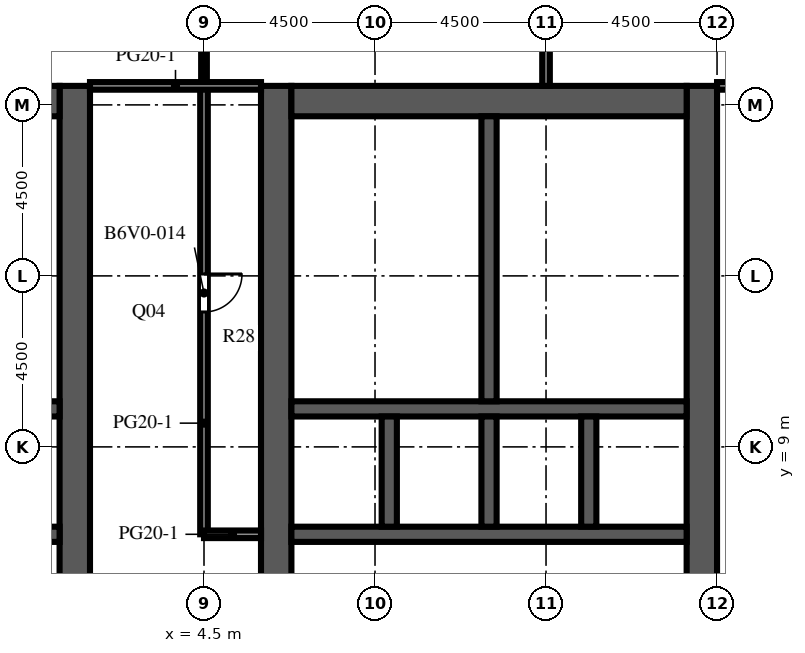
"""IFC4 building model, lengths in metres.
Left out: names, types, materials, properties, quantities, classifications, styles, units other than length and angle.
Written with IfcOpenShell. Run it as: python <this file> out.ifc"""

import sys

from ifc_helpers import new_model, si_unit, direction, frame, frame_2d, origin, place, context, subcontext, project, spatial, rectangle, extrude, element, fill, save


model = new_model("IFC4")
c1 = context("Model", 3, precision=1e-05, world=origin(), true_north=direction((0.0, 1.0)))
c2 = subcontext(c1, "Body", "Model", "MODEL_VIEW")
j1 = project(units=[si_unit("LENGTHUNIT", "METRE"), si_unit("PLANEANGLEUNIT", "RADIAN")], contexts=[c1])
p1 = place(None, origin())
s1 = spatial("IfcSite", under=j1, at=p1, CompositionType="ELEMENT")
p2 = place(p1, origin())
s2 = spatial("IfcBuilding", under=s1, at=p2, CompositionType="ELEMENT")
p3 = place(p2, frame((0.0, 0.0, 199.7)))
s3 = spatial("IfcBuildingStorey", under=s2, at=p3, CompositionType="ELEMENT", Elevation=199.7)
p4 = place(p3, frame((1.1, -9.0, 0.0), z_axis=(0.0, 0.0, 1.0), x_axis=(0.0, 1.0, 0.0)))
e1 = element("IfcWall", 1, at=p4, inside=s3, PredefinedType="SHEAR", context=c2, shape_type="SweptSolid", body=[
    extrude(rectangle(XDim=27.5, YDim=0.8, at=frame_2d((13.75, 0.0))), origin(), (0.0, 0.0, 1.0), 4.1),
])
p5 = place(p4, frame((12.55, 0.0, 0.0)))
e2 = element("IfcOpeningElement", 2, at=p5, cuts=e1, PredefinedType="OPENING", context=c2, shape_type="SweptSolid", body=[
    extrude(rectangle(XDim=2.4, YDim=2.4, at=frame_2d((1.2, 1.2))), frame((0.0, 0.41, 0.0), z_axis=(0.0, -1.0, 0.0), x_axis=(1.0, 0.0, 0.0)), (0.0, 0.0, 1.0), 0.82),
])
p6 = place(p4, frame((3.95, 0.0, 0.0)))
e3 = element("IfcOpeningElement", 3, at=p6, cuts=e1, PredefinedType="OPENING", context=c2, shape_type="SweptSolid", body=[
    extrude(rectangle(XDim=1.2, YDim=2.1, at=frame_2d((0.6, 1.05))), frame((0.0, 0.41, 0.0), z_axis=(0.0, -1.0, 0.0), x_axis=(1.0, 0.0, 0.0)), (0.0, 0.0, 1.0), 0.82),
])
p7 = place(p4, frame((19.45, 0.0, 0.0)))
e4 = element("IfcOpeningElement", 4, at=p7, cuts=e1, PredefinedType="OPENING", context=c2, shape_type="SweptSolid", body=[
    extrude(rectangle(XDim=1.0, YDim=2.1, at=frame_2d((0.5, 1.05))), frame((0.0, 0.41, 0.0), z_axis=(0.0, -1.0, 0.0), x_axis=(1.0, 0.0, 0.0)), (0.0, 0.0, 1.0), 0.82),
])
p8 = place(p4, frame((21.137, 0.0, 0.0)))
e5 = element("IfcOpeningElement", 5, at=p8, cuts=e1, PredefinedType="OPENING", context=c2, shape_type="SweptSolid", body=[
    extrude(rectangle(XDim=1.0, YDim=2.1, at=frame_2d((0.5, 1.05))), frame((0.0, 0.41, 0.0), z_axis=(0.0, -1.0, 0.0), x_axis=(1.0, 0.0, 0.0)), (0.0, 0.0, 1.0), 0.82),
])
p9 = place(p4, frame((23.2, 0.0, 0.0)))
e6 = element("IfcOpeningElement", 6, at=p9, cuts=e1, PredefinedType="OPENING", context=c2, shape_type="SweptSolid", body=[
    extrude(rectangle(XDim=1.0, YDim=2.1, at=frame_2d((0.5, 1.05))), frame((0.0, 0.41, 0.0), z_axis=(0.0, -1.0, 0.0), x_axis=(1.0, 0.0, 0.0)), (0.0, 0.0, 1.0), 0.82),
])
p10 = place(p4, frame((25.262, 0.0, 0.0)))
e7 = element("IfcOpeningElement", 7, at=p10, cuts=e1, PredefinedType="OPENING", context=c2, shape_type="SweptSolid", body=[
    extrude(rectangle(XDim=1.0, YDim=2.1, at=frame_2d((0.5, 1.05))), frame((0.0, 0.41, 0.0), z_axis=(0.0, -1.0, 0.0), x_axis=(1.0, 0.0, 0.0)), (0.0, 0.0, 1.0), 0.82),
])
p11 = place(p3, frame((-9.7, 18.1, 0.0), z_axis=(0.0, 0.0, 1.0), x_axis=(1.0, 0.0, 0.0)))
e8 = element("IfcWall", 8, at=p11, inside=s3, PredefinedType="SHEAR", context=c2, shape_type="SweptSolid", body=[
    extrude(rectangle(XDim=10.4, YDim=0.8, at=frame_2d((5.2, 0.0))), origin(), (0.0, 0.0, 1.0), 4.1),
])
p12 = place(p3, frame((-9.7, 6.7, 0.0), z_axis=(0.0, 0.0, 1.0), x_axis=(1.0, 0.0, 0.0)))
e9 = element("IfcWall", 9, at=p12, inside=s3, PredefinedType="SHEAR", context=c2, shape_type="SweptSolid", body=[
    extrude(rectangle(XDim=10.4, YDim=0.4, at=frame_2d((5.2, 0.0))), origin(), (0.0, 0.0, 1.0), 4.1),
])
p13 = place(p12, frame((3.337, 0.0, 0.0)))
e10 = element("IfcOpeningElement", 10, at=p13, cuts=e9, PredefinedType="OPENING", context=c2, shape_type="SweptSolid", body=[
    extrude(rectangle(XDim=1.1, YDim=2.1, at=frame_2d((0.55, 1.05))), frame((0.0, 0.21, 0.0), z_axis=(0.0, -1.0, 0.0), x_axis=(1.0, 0.0, 0.0)), (0.0, 0.0, 1.0), 0.42),
])
p14 = place(p12, frame((5.962, 0.0, 0.0)))
e11 = element("IfcOpeningElement", 11, at=p14, cuts=e9, PredefinedType="OPENING", context=c2, shape_type="SweptSolid", body=[
    extrude(rectangle(XDim=1.1, YDim=2.1, at=frame_2d((0.55, 1.05))), frame((0.0, 0.21, 0.0), z_axis=(0.0, -1.0, 0.0), x_axis=(1.0, 0.0, 0.0)), (0.0, 0.0, 1.0), 0.42),
])
p15 = place(p12, frame((8.663, 0.0, 0.0)))
e12 = element("IfcOpeningElement", 12, at=p15, cuts=e9, PredefinedType="OPENING", context=c2, shape_type="SweptSolid", body=[
    extrude(rectangle(XDim=1.1, YDim=2.1, at=frame_2d((0.55, 1.05))), frame((0.0, 0.21, 0.0), z_axis=(0.0, -1.0, 0.0), x_axis=(1.0, 0.0, 0.0)), (0.0, 0.0, 1.0), 0.42),
])
p16 = place(p12, frame((0.688, 0.0, 0.0)))
e13 = element("IfcOpeningElement", 13, at=p16, cuts=e9, PredefinedType="OPENING", context=c2, shape_type="SweptSolid", body=[
    extrude(rectangle(XDim=1.0, YDim=2.1, at=frame_2d((0.5, 1.05))), frame((0.0, 0.21, 0.0), z_axis=(0.0, -1.0, 0.0), x_axis=(1.0, 0.0, 0.0)), (0.0, 0.0, 1.0), 0.42),
])
p17 = place(p3, frame((-9.7, 10.0, 0.0), z_axis=(0.0, 0.0, 1.0), x_axis=(1.0, 0.0, 0.0)))
e14 = element("IfcWall", 14, at=p17, inside=s3, PredefinedType="SHEAR", context=c2, shape_type="SweptSolid", body=[
    extrude(rectangle(XDim=10.4, YDim=0.4, at=frame_2d((5.2, 0.0))), origin(), (0.0, 0.0, 1.0), 4.1),
])
p18 = place(p3, frame((6.4, -9.0, 0.0), z_axis=(0.0, 0.0, 1.0), x_axis=(0.0, 1.0, 0.0)))
e15 = element("IfcWall", 15, at=p18, inside=s3, PredefinedType="SHEAR", context=c2, shape_type="SweptSolid", body=[
    extrude(rectangle(XDim=27.5, YDim=0.8, at=frame_2d((13.75, 0.0))), origin(), (0.0, 0.0, 1.0), 4.1),
])
p19 = place(p18, frame((12.55, 0.0, 0.0)))
e16 = element("IfcOpeningElement", 16, at=p19, cuts=e15, PredefinedType="OPENING", context=c2, shape_type="SweptSolid", body=[
    extrude(rectangle(XDim=2.4, YDim=2.4, at=frame_2d((1.2, 1.2))), frame((0.0, 0.41, 0.0), z_axis=(0.0, -1.0, 0.0), x_axis=(1.0, 0.0, 0.0)), (0.0, 0.0, 1.0), 0.82),
])
p20 = place(p18, frame((3.95, 0.0, 0.0)))
e17 = element("IfcOpeningElement", 17, at=p20, cuts=e15, PredefinedType="OPENING", context=c2, shape_type="SweptSolid", body=[
    extrude(rectangle(XDim=1.2, YDim=2.1, at=frame_2d((0.6, 1.05))), frame((0.0, 0.41, 0.0), z_axis=(0.0, -1.0, 0.0), x_axis=(1.0, 0.0, 0.0)), (0.0, 0.0, 1.0), 0.82),
])
p21 = place(p18, frame((19.45, 0.0, 0.0)))
e18 = element("IfcOpeningElement", 18, at=p21, cuts=e15, PredefinedType="OPENING", context=c2, shape_type="SweptSolid", body=[
    extrude(rectangle(XDim=1.0, YDim=2.1, at=frame_2d((0.5, 1.05))), frame((0.0, 0.41, 0.0), z_axis=(0.0, -1.0, 0.0), x_axis=(1.0, 0.0, 0.0)), (0.0, 0.0, 1.0), 0.82),
])
p22 = place(p18, frame((21.137, 0.0, 0.0)))
e19 = element("IfcOpeningElement", 19, at=p22, cuts=e15, PredefinedType="OPENING", context=c2, shape_type="SweptSolid", body=[
    extrude(rectangle(XDim=1.0, YDim=2.1, at=frame_2d((0.5, 1.05))), frame((0.0, 0.41, 0.0), z_axis=(0.0, -1.0, 0.0), x_axis=(1.0, 0.0, 0.0)), (0.0, 0.0, 1.0), 0.82),
])
p23 = place(p18, frame((23.2, 0.0, 0.0)))
e20 = element("IfcOpeningElement", 20, at=p23, cuts=e15, PredefinedType="OPENING", context=c2, shape_type="SweptSolid", body=[
    extrude(rectangle(XDim=1.0, YDim=2.1, at=frame_2d((0.5, 1.05))), frame((0.0, 0.41, 0.0), z_axis=(0.0, -1.0, 0.0), x_axis=(1.0, 0.0, 0.0)), (0.0, 0.0, 1.0), 0.82),
])
p24 = place(p18, frame((25.262, 0.0, 0.0)))
e21 = element("IfcOpeningElement", 21, at=p24, cuts=e15, PredefinedType="OPENING", context=c2, shape_type="SweptSolid", body=[
    extrude(rectangle(XDim=1.0, YDim=2.1, at=frame_2d((0.5, 1.05))), frame((0.0, 0.41, 0.0), z_axis=(0.0, -1.0, 0.0), x_axis=(1.0, 0.0, 0.0)), (0.0, 0.0, 1.0), 0.82),
])
p25 = place(p3, frame((17.6, -9.0, 0.0), z_axis=(0.0, 0.0, 1.0), x_axis=(0.0, 1.0, 0.0)))
e22 = element("IfcWall", 22, at=p25, inside=s3, PredefinedType="SHEAR", context=c2, shape_type="SweptSolid", body=[
    extrude(rectangle(XDim=27.5, YDim=0.8, at=frame_2d((13.75, 0.0))), origin(), (0.0, 0.0, 1.0), 4.1),
])
p26 = place(p25, frame((12.55, 0.0, 0.0)))
e23 = element("IfcOpeningElement", 23, at=p26, cuts=e22, PredefinedType="OPENING", context=c2, shape_type="SweptSolid", body=[
    extrude(rectangle(XDim=2.4, YDim=2.4, at=frame_2d((1.2, 1.2))), frame((0.0, 0.41, 0.0), z_axis=(0.0, -1.0, 0.0), x_axis=(1.0, 0.0, 0.0)), (0.0, 0.0, 1.0), 0.82),
])
p27 = place(p25, frame((6.825, 0.0, 0.0)))
e24 = element("IfcOpeningElement", 24, at=p27, cuts=e22, PredefinedType="OPENING", context=c2, shape_type="SweptSolid", body=[
    extrude(rectangle(XDim=1.2, YDim=2.1, at=frame_2d((0.6, 1.05))), frame((0.0, 0.41, 0.0), z_axis=(0.0, -1.0, 0.0), x_axis=(1.0, 0.0, 0.0)), (0.0, 0.0, 1.0), 0.82),
])
p28 = place(p25, frame((19.475, 0.0, 0.0)))
e25 = element("IfcOpeningElement", 25, at=p28, cuts=e22, PredefinedType="OPENING", context=c2, shape_type="SweptSolid", body=[
    extrude(rectangle(XDim=1.2, YDim=2.1, at=frame_2d((0.6, 1.05))), frame((0.0, 0.41, 0.0), z_axis=(0.0, -1.0, 0.0), x_axis=(1.0, 0.0, 0.0)), (0.0, 0.0, 1.0), 0.82),
])
p29 = place(p3, frame((6.8, 18.1, 0.0), z_axis=(0.0, 0.0, 1.0), x_axis=(1.0, 0.0, 0.0)))
e26 = element("IfcWall", 26, at=p29, inside=s3, PredefinedType="SHEAR", context=c2, shape_type="SweptSolid", body=[
    extrude(rectangle(XDim=10.4, YDim=0.8, at=frame_2d((5.2, 0.0))), origin(), (0.0, 0.0, 1.0), 4.1),
])
p30 = place(p3, frame((6.8, 6.7, 0.0), z_axis=(0.0, 0.0, 1.0), x_axis=(1.0, 0.0, 0.0)))
e27 = element("IfcWall", 27, at=p30, inside=s3, PredefinedType="SHEAR", context=c2, shape_type="SweptSolid", body=[
    extrude(rectangle(XDim=10.4, YDim=0.4, at=frame_2d((5.2, 0.0))), origin(), (0.0, 0.0, 1.0), 4.1),
])
p31 = place(p30, frame((3.337, 0.0, 0.0)))
e28 = element("IfcOpeningElement", 28, at=p31, cuts=e27, PredefinedType="OPENING", context=c2, shape_type="SweptSolid", body=[
    extrude(rectangle(XDim=1.1, YDim=2.1, at=frame_2d((0.55, 1.05))), frame((0.0, 0.21, 0.0), z_axis=(0.0, -1.0, 0.0), x_axis=(1.0, 0.0, 0.0)), (0.0, 0.0, 1.0), 0.42),
])
p32 = place(p30, frame((5.962, 0.0, 0.0)))
e29 = element("IfcOpeningElement", 29, at=p32, cuts=e27, PredefinedType="OPENING", context=c2, shape_type="SweptSolid", body=[
    extrude(rectangle(XDim=1.1, YDim=2.1, at=frame_2d((0.55, 1.05))), frame((0.0, 0.21, 0.0), z_axis=(0.0, -1.0, 0.0), x_axis=(1.0, 0.0, 0.0)), (0.0, 0.0, 1.0), 0.42),
])
p33 = place(p30, frame((8.663, 0.0, 0.0)))
e30 = element("IfcOpeningElement", 30, at=p33, cuts=e27, PredefinedType="OPENING", context=c2, shape_type="SweptSolid", body=[
    extrude(rectangle(XDim=1.1, YDim=2.1, at=frame_2d((0.55, 1.05))), frame((0.0, 0.21, 0.0), z_axis=(0.0, -1.0, 0.0), x_axis=(1.0, 0.0, 0.0)), (0.0, 0.0, 1.0), 0.42),
])
p34 = place(p30, frame((0.688, 0.0, 0.0)))
e31 = element("IfcOpeningElement", 31, at=p34, cuts=e27, PredefinedType="OPENING", context=c2, shape_type="SweptSolid", body=[
    extrude(rectangle(XDim=1.0, YDim=2.1, at=frame_2d((0.5, 1.05))), frame((0.0, 0.21, 0.0), z_axis=(0.0, -1.0, 0.0), x_axis=(1.0, 0.0, 0.0)), (0.0, 0.0, 1.0), 0.42),
])
p35 = place(p3, frame((6.8, 10.0, 0.0), z_axis=(0.0, 0.0, 1.0), x_axis=(1.0, 0.0, 0.0)))
e32 = element("IfcWall", 32, at=p35, inside=s3, PredefinedType="SHEAR", context=c2, shape_type="SweptSolid", body=[
    extrude(rectangle(XDim=10.4, YDim=0.4, at=frame_2d((5.2, 0.0))), origin(), (0.0, 0.0, 1.0), 4.1),
])
for number, where, z_axis, x_axis in (
    (33, (9.375, 6.9, 0.0), (0.0, 0.0, 1.0), (0.0, 1.0, 0.0)),
    (34, (12.0, 6.9, 0.0), (0.0, 0.0, 1.0), (0.0, 1.0, 0.0)),
    (35, (14.625, 6.9, 0.0), (0.0, 0.0, 1.0), (0.0, 1.0, 0.0)),
):
    element("IfcWall", number, at=place(p3, frame(where, z_axis=z_axis, x_axis=x_axis)), inside=s3, PredefinedType="SHEAR", context=c2, shape_type="SweptSolid", body=[
        extrude(rectangle(XDim=2.9, YDim=0.4, at=frame_2d((1.45, 0.0))), origin(), (0.0, 0.0, 1.0), 4.1),
    ])
p36 = place(p3, frame((12.0, 10.2, 0.0), z_axis=(0.0, 0.0, 1.0), x_axis=(0.0, 1.0, 0.0)))
e36 = element("IfcWall", 36, at=p36, inside=s3, PredefinedType="SHEAR", context=c2, shape_type="SweptSolid", body=[
    extrude(rectangle(XDim=7.5, YDim=0.4, at=frame_2d((3.75, 0.0))), origin(), (0.0, 0.0, 1.0), 4.1),
])
for number, where, z_axis, x_axis in (
    (37, (-4.3, 11.7, 0.0), (0.0, 0.0, 1.0), (1.0, 0.0, 0.0)),
    (38, (-4.3, 13.575, 0.0), (0.0, 0.0, 1.0), (1.0, 0.0, 0.0)),
    (39, (-4.3, 15.825, 0.0), (0.0, 0.0, 1.0), (1.0, 0.0, 0.0)),
    (40, (6.8, 11.7, 0.0), (0.0, 0.0, 1.0), (1.0, 0.0, 0.0)),
    (41, (6.8, 13.575, 0.0), (0.0, 0.0, 1.0), (1.0, 0.0, 0.0)),
    (42, (6.8, 15.825, 0.0), (0.0, 0.0, 1.0), (1.0, 0.0, 0.0)),
):
    element("IfcWall", number, at=place(p3, frame(where, z_axis=z_axis, x_axis=x_axis)), inside=s3, PredefinedType="PARTITIONING", context=c2, shape_type="SweptSolid", body=[
        extrude(rectangle(XDim=5.0, YDim=0.1, at=frame_2d((2.5, 0.0))), origin(), (0.0, 0.0, 1.0), 3.65),
    ])
p37 = place(p3, frame((4.5, 26.5, 0.0), z_axis=(0.0, 0.0, 1.0), x_axis=(0.0, -1.0, 0.0)))
e43 = element("IfcWall", 43, at=p37, inside=s3, PredefinedType="PARTITIONING", context=c2, shape_type="SweptSolid", body=[
    extrude(rectangle(XDim=8.0, YDim=0.15, at=frame_2d((4.0, 0.0))), origin(), (0.0, 0.0, 1.0), 3.65),
])
p38 = place(p37, frame((3.15, 0.0, 0.0)))
e44 = element("IfcOpeningElement", 44, at=p38, cuts=e43, PredefinedType="OPENING", context=c2, shape_type="SweptSolid", body=[
    extrude(rectangle(XDim=1.0, YDim=2.1, at=frame_2d((0.5, 1.05))), frame((0.0, 0.085, 0.0), z_axis=(0.0, -1.0, 0.0), x_axis=(1.0, 0.0, 0.0)), (0.0, 0.0, 1.0), 0.17),
])
p39 = place(p3, frame((4.5, 18.5, 0.0), z_axis=(0.0, 0.0, 1.0), x_axis=(0.0, -1.0, 0.0)))
e45 = element("IfcWall", 45, at=p39, inside=s3, PredefinedType="PARTITIONING", context=c2, shape_type="SweptSolid", body=[
    extrude(rectangle(XDim=11.8, YDim=0.2, at=frame_2d((5.9, 0.0))), origin(), (0.0, 0.0, 1.0), 3.65),
])
p40 = place(p39, frame((4.95, 0.0, 0.0)))
e46 = element("IfcOpeningElement", 46, at=p40, cuts=e45, PredefinedType="OPENING", context=c2, shape_type="SweptSolid", body=[
    extrude(rectangle(XDim=1.0, YDim=2.1, at=frame_2d((0.5, 1.05))), frame((0.0, 0.11, 0.0), z_axis=(0.0, -1.0, 0.0), x_axis=(1.0, 0.0, 0.0)), (0.0, 0.0, 1.0), 0.22),
])
p41 = place(p3, frame((13.5, 18.5, 0.0), z_axis=(0.0, 0.0, 1.0), x_axis=(0.0, 1.0, 0.0)))
e47 = element("IfcWall", 47, at=p41, inside=s3, PredefinedType="PARTITIONING", context=c2, shape_type="SweptSolid", body=[
    extrude(rectangle(XDim=8.0, YDim=0.2, at=frame_2d((4.0, 0.0))), origin(), (0.0, 0.0, 1.0), 3.65),
])
p42 = place(p3, frame((4.5, 6.7, 0.0), z_axis=(0.0, 0.0, 1.0), x_axis=(1.0, 0.0, 0.0)))
e48 = element("IfcWall", 48, at=p42, inside=s3, PredefinedType="PARTITIONING", context=c2, shape_type="SweptSolid", body=[
    extrude(rectangle(XDim=1.5, YDim=0.2, at=frame_2d((0.75, 0.0))), origin(), (0.0, 0.0, 1.0), 3.65),
])
p43 = place(p3, frame((1.5, 18.5, 0.0), z_axis=(0.0, 0.0, 1.0), x_axis=(1.0, 0.0, 0.0)))
e49 = element("IfcWall", 49, at=p43, inside=s3, PredefinedType="PARTITIONING", context=c2, shape_type="SweptSolid", body=[
    extrude(rectangle(XDim=4.5, YDim=0.2, at=frame_2d((2.25, 0.0))), origin(), (0.0, 0.0, 1.0), 3.65),
])
p44 = place(p3, frame((18.0, 18.5, 0.0), z_axis=(0.0, 0.0, 1.0), x_axis=(1.0, 0.0, 0.0)))
e50 = element("IfcWall", 50, at=p44, inside=s3, PredefinedType="PARTITIONING", context=c2, shape_type="SweptSolid", body=[
    extrude(rectangle(XDim=3.0, YDim=0.2, at=frame_2d((1.5, 0.0))), origin(), (0.0, 0.0, 1.0), 3.65),
])
p45 = place(p44, frame((1.1, 0.0, 0.0)))
e51 = element("IfcOpeningElement", 51, at=p45, cuts=e50, PredefinedType="OPENING", context=c2, shape_type="SweptSolid", body=[
    extrude(rectangle(XDim=1.0, YDim=2.1, at=frame_2d((0.5, 1.05))), frame((0.0, 0.11, 0.0), z_axis=(0.0, -1.0, 0.0), x_axis=(1.0, 0.0, 0.0)), (0.0, 0.0, 1.0), 0.22),
])
p46 = place(p31, origin())
e52 = element("IfcDoor", 52, at=p46, inside=s3, OperationType="DOUBLE_DOOR_SLIDING", PredefinedType="DOOR", context=c2, shape_type="SweptSolid", body=[
    extrude(rectangle(XDim=1.1, YDim=2.1, at=frame_2d((0.55, 1.05))), frame((0.0, 0.025, 0.0), z_axis=(0.0, -1.0, 0.0), x_axis=(1.0, 0.0, 0.0)), (0.0, 0.0, 1.0), 0.05),
])
fill(e28, e52)
p47 = place(p32, origin())
e53 = element("IfcDoor", 53, at=p47, inside=s3, OperationType="DOUBLE_DOOR_SLIDING", PredefinedType="DOOR", context=c2, shape_type="SweptSolid", body=[
    extrude(rectangle(XDim=1.1, YDim=2.1, at=frame_2d((0.55, 1.05))), frame((0.0, 0.025, 0.0), z_axis=(0.0, -1.0, 0.0), x_axis=(1.0, 0.0, 0.0)), (0.0, 0.0, 1.0), 0.05),
])
fill(e29, e53)
p48 = place(p33, origin())
e54 = element("IfcDoor", 54, at=p48, inside=s3, OperationType="DOUBLE_DOOR_SLIDING", PredefinedType="DOOR", context=c2, shape_type="SweptSolid", body=[
    extrude(rectangle(XDim=1.1, YDim=2.1, at=frame_2d((0.55, 1.05))), frame((0.0, 0.025, 0.0), z_axis=(0.0, -1.0, 0.0), x_axis=(1.0, 0.0, 0.0)), (0.0, 0.0, 1.0), 0.05),
])
fill(e30, e54)
p49 = place(p5, origin())
e55 = element("IfcDoor", 55, at=p49, inside=s3, OperationType="DOUBLE_DOOR_DOUBLE_SWING", PredefinedType="DOOR", context=c2, shape_type="SweptSolid", body=[
    extrude(rectangle(XDim=2.4, YDim=2.4, at=frame_2d((1.2, 1.2))), frame((0.0, 0.025, 0.0), z_axis=(0.0, -1.0, 0.0), x_axis=(1.0, 0.0, 0.0)), (0.0, 0.0, 1.0), 0.05),
])
fill(e2, e55)
p50 = place(p19, origin())
e56 = element("IfcDoor", 56, at=p50, inside=s3, OperationType="DOUBLE_DOOR_DOUBLE_SWING", PredefinedType="DOOR", context=c2, shape_type="SweptSolid", body=[
    extrude(rectangle(XDim=2.4, YDim=2.4, at=frame_2d((1.2, 1.2))), frame((0.0, 0.025, 0.0), z_axis=(0.0, -1.0, 0.0), x_axis=(1.0, 0.0, 0.0)), (0.0, 0.0, 1.0), 0.05),
])
fill(e16, e56)
p51 = place(p26, origin())
e57 = element("IfcDoor", 57, at=p51, inside=s3, OperationType="DOUBLE_DOOR_DOUBLE_SWING", PredefinedType="DOOR", context=c2, shape_type="SweptSolid", body=[
    extrude(rectangle(XDim=2.4, YDim=2.4, at=frame_2d((1.2, 1.2))), frame((0.0, 0.025, 0.0), z_axis=(0.0, -1.0, 0.0), x_axis=(1.0, 0.0, 0.0)), (0.0, 0.0, 1.0), 0.05),
])
fill(e23, e57)
p52 = place(p28, frame((1.2, 0.0, 0.0), z_axis=(0.0, 0.0, 1.0), x_axis=(-1.0, 0.0, 0.0)))
e58 = element("IfcDoor", 58, at=p52, inside=s3, OperationType="SINGLE_SWING_LEFT", PredefinedType="DOOR", context=c2, shape_type="SweptSolid", body=[
    extrude(rectangle(XDim=1.2, YDim=2.1, at=frame_2d((0.6, 1.05))), frame((0.0, 0.025, 0.0), z_axis=(0.0, -1.0, 0.0), x_axis=(1.0, 0.0, 0.0)), (0.0, 0.0, 1.0), 0.05),
])
fill(e25, e58)
p53 = place(p7, origin())
e59 = element("IfcDoor", 59, at=p53, inside=s3, OperationType="SINGLE_SWING_LEFT", PredefinedType="DOOR", context=c2, shape_type="SweptSolid", body=[
    extrude(rectangle(XDim=1.0, YDim=2.1, at=frame_2d((0.5, 1.05))), frame((0.0, 0.375, 0.0), z_axis=(0.0, -1.0, 0.0), x_axis=(1.0, 0.0, 0.0)), (0.0, 0.0, 1.0), 0.05),
])
fill(e4, e59)
p54 = place(p8, origin())
e60 = element("IfcDoor", 60, at=p54, inside=s3, OperationType="SINGLE_SWING_RIGHT", PredefinedType="DOOR", context=c2, shape_type="SweptSolid", body=[
    extrude(rectangle(XDim=1.0, YDim=2.1, at=frame_2d((0.5, 1.05))), frame((0.0, 0.375, 0.0), z_axis=(0.0, -1.0, 0.0), x_axis=(1.0, 0.0, 0.0)), (0.0, 0.0, 1.0), 0.05),
])
fill(e5, e60)
p55 = place(p9, origin())
e61 = element("IfcDoor", 61, at=p55, inside=s3, OperationType="SINGLE_SWING_LEFT", PredefinedType="DOOR", context=c2, shape_type="SweptSolid", body=[
    extrude(rectangle(XDim=1.0, YDim=2.1, at=frame_2d((0.5, 1.05))), frame((0.0, 0.375, 0.0), z_axis=(0.0, -1.0, 0.0), x_axis=(1.0, 0.0, 0.0)), (0.0, 0.0, 1.0), 0.05),
])
fill(e6, e61)
p56 = place(p10, origin())
e62 = element("IfcDoor", 62, at=p56, inside=s3, OperationType="SINGLE_SWING_RIGHT", PredefinedType="DOOR", context=c2, shape_type="SweptSolid", body=[
    extrude(rectangle(XDim=1.0, YDim=2.1, at=frame_2d((0.5, 1.05))), frame((0.0, 0.375, 0.0), z_axis=(0.0, -1.0, 0.0), x_axis=(1.0, 0.0, 0.0)), (0.0, 0.0, 1.0), 0.05),
])
fill(e7, e62)
p57 = place(p34, origin())
e63 = element("IfcDoor", 63, at=p57, inside=s3, OperationType="SINGLE_SWING_LEFT", PredefinedType="DOOR", context=c2, shape_type="SweptSolid", body=[
    extrude(rectangle(XDim=1.0, YDim=2.1, at=frame_2d((0.5, 1.05))), frame((0.0, 0.025, 0.0), z_axis=(0.0, -1.0, 0.0), x_axis=(1.0, 0.0, 0.0)), (0.0, 0.0, 1.0), 0.05),
])
fill(e31, e63)
p58 = place(p21, origin())
e64 = element("IfcDoor", 64, at=p58, inside=s3, OperationType="SINGLE_SWING_RIGHT", PredefinedType="DOOR", context=c2, shape_type="SweptSolid", body=[
    extrude(rectangle(XDim=1.0, YDim=2.1, at=frame_2d((0.5, 1.05))), frame((0.0, -0.325, 0.0), z_axis=(0.0, -1.0, 0.0), x_axis=(1.0, 0.0, 0.0)), (0.0, 0.0, 1.0), 0.05),
])
fill(e18, e64)
p59 = place(p22, origin())
e65 = element("IfcDoor", 65, at=p59, inside=s3, OperationType="SINGLE_SWING_LEFT", PredefinedType="DOOR", context=c2, shape_type="SweptSolid", body=[
    extrude(rectangle(XDim=1.0, YDim=2.1, at=frame_2d((0.5, 1.05))), frame((0.0, -0.325, 0.0), z_axis=(0.0, -1.0, 0.0), x_axis=(1.0, 0.0, 0.0)), (0.0, 0.0, 1.0), 0.05),
])
fill(e19, e65)
p60 = place(p23, origin())
e66 = element("IfcDoor", 66, at=p60, inside=s3, OperationType="SINGLE_SWING_RIGHT", PredefinedType="DOOR", context=c2, shape_type="SweptSolid", body=[
    extrude(rectangle(XDim=1.0, YDim=2.1, at=frame_2d((0.5, 1.05))), frame((0.0, -0.325, 0.0), z_axis=(0.0, -1.0, 0.0), x_axis=(1.0, 0.0, 0.0)), (0.0, 0.0, 1.0), 0.05),
])
fill(e20, e66)
p61 = place(p24, origin())
e67 = element("IfcDoor", 67, at=p61, inside=s3, OperationType="SINGLE_SWING_LEFT", PredefinedType="DOOR", context=c2, shape_type="SweptSolid", body=[
    extrude(rectangle(XDim=1.0, YDim=2.1, at=frame_2d((0.5, 1.05))), frame((0.0, -0.325, 0.0), z_axis=(0.0, -1.0, 0.0), x_axis=(1.0, 0.0, 0.0)), (0.0, 0.0, 1.0), 0.05),
])
fill(e21, e67)
p62 = place(p40, origin())
e68 = element("IfcDoor", 68, at=p62, inside=s3, OperationType="SINGLE_SWING_LEFT", PredefinedType="DOOR", context=c2, shape_type="SweptSolid", body=[
    extrude(rectangle(XDim=1.0, YDim=2.1, at=frame_2d((0.5, 1.05))), frame((0.0, 0.025, 0.0), z_axis=(0.0, -1.0, 0.0), x_axis=(1.0, 0.0, 0.0)), (0.0, 0.0, 1.0), 0.05),
])
fill(e46, e68)
save(model, sys.argv[1])
